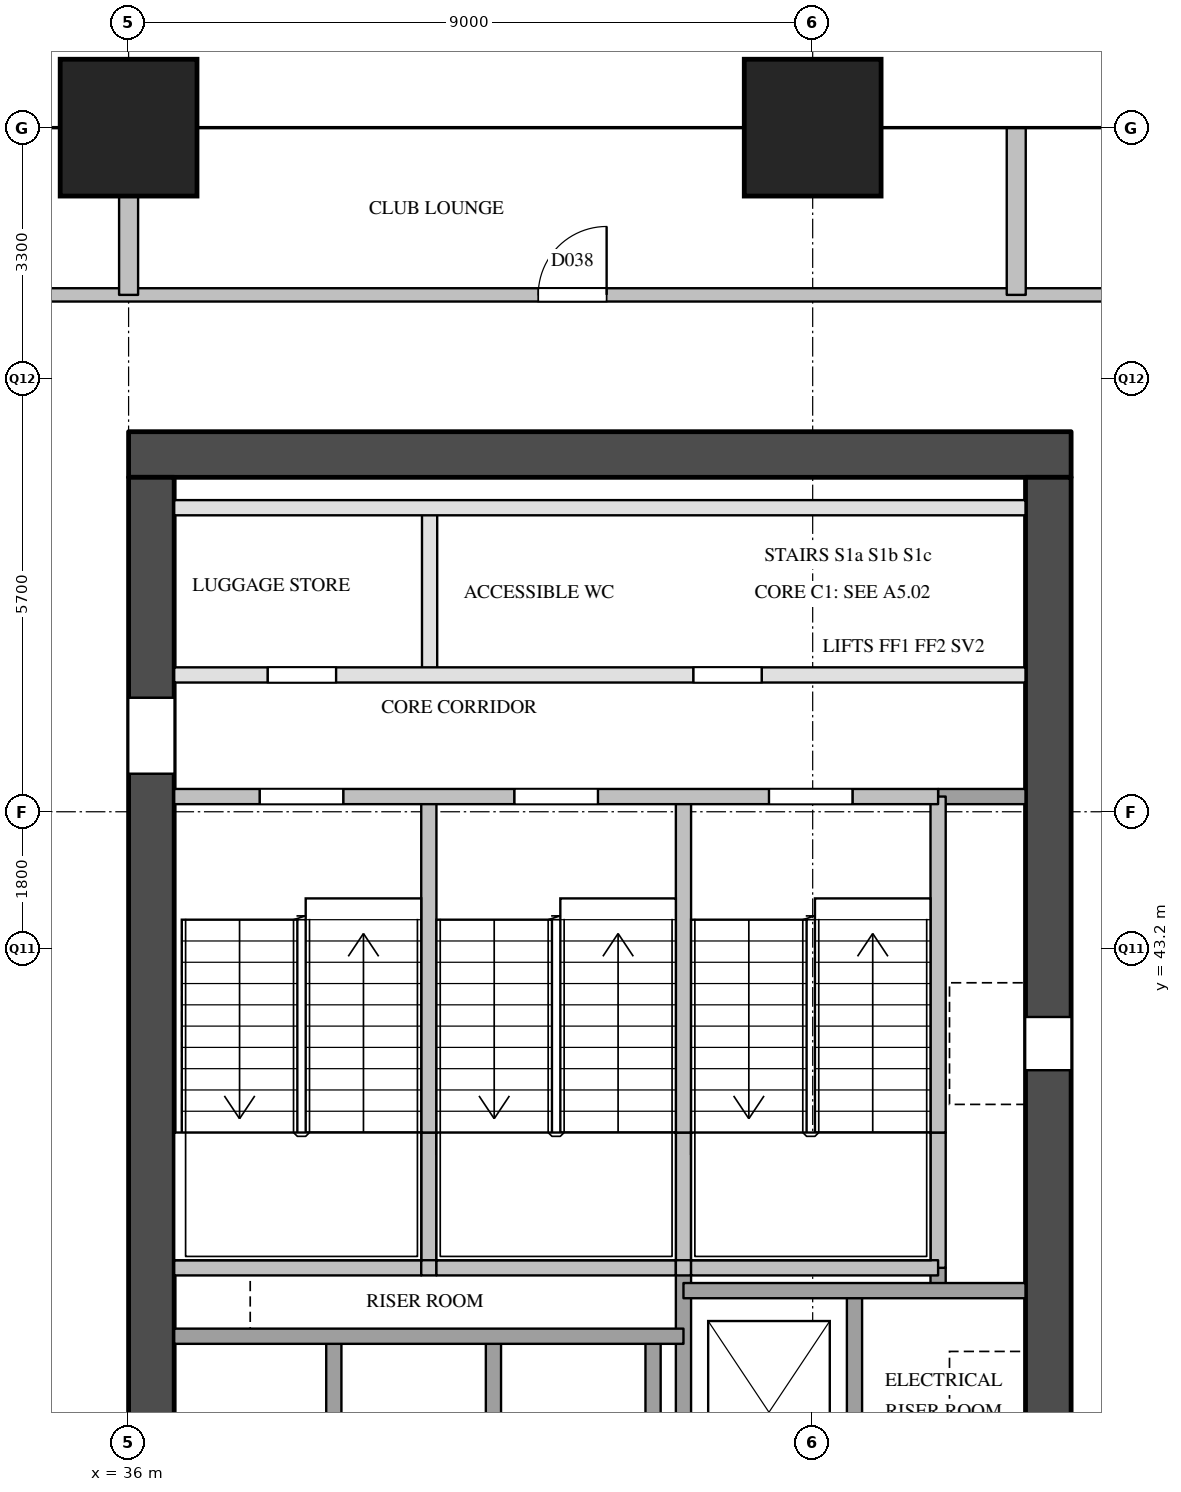
"""IFC4 building model, lengths in metres.
Left out: names, types, materials, properties, quantities, classifications, styles, units other than length and angle.
Written with IfcOpenShell. Run it as: python <this file> out.ifc"""

import sys

from ifc_helpers import new_model, si_unit, direction, frame, frame_2d, origin, origin_2d, place, context, subcontext, project, spatial, rectangle, extrude, element, fill, save


model = new_model("IFC4")
c1 = context("Model", 3, precision=1e-05, world=origin(), true_north=direction((0.0, 1.0)))
c2 = subcontext(c1, "Body", "Model", "MODEL_VIEW")
j1 = project(units=[si_unit("LENGTHUNIT", "METRE"), si_unit("PLANEANGLEUNIT", "RADIAN")], contexts=[c1])
p1 = place(None, origin())
s1 = spatial("IfcSite", under=j1, at=p1, CompositionType="ELEMENT")
p2 = place(p1, origin())
s2 = spatial("IfcBuilding", under=s1, at=p2, CompositionType="ELEMENT")
p3 = place(p2, frame((0.0, 0.0, 108.2)))
s3 = spatial("IfcBuildingStorey", under=s2, at=p3, CompositionType="ELEMENT", Elevation=108.2)
for number, where, z_axis, x_axis in (
    (1, (36.0, 54.0, 0.0), (0.0, 0.0, 1.0), (1.0, 0.0, 0.0)),
    (2, (45.0, 54.0, 0.0), (0.0, 0.0, 1.0), (1.0, 0.0, 0.0)),
):
    element("IfcColumn", number, at=place(p3, frame(where, z_axis=z_axis, x_axis=x_axis)), inside=s3, PredefinedType="COLUMN", context=c2, shape_type="SweptSolid", body=[
        extrude(rectangle(XDim=1.8, YDim=1.8, at=origin_2d()), origin(), (0.0, 0.0, 1.0), 3.8),
    ])
p4 = place(p3, frame((36.0, 49.7, 0.0), z_axis=(0.0, 0.0, 1.0), x_axis=(1.0, 0.0, 0.0)))
e3 = element("IfcWall", 3, at=p4, inside=s3, PredefinedType="SHEAR", context=c2, shape_type="SweptSolid", body=[
    extrude(rectangle(XDim=12.4, YDim=0.6, at=frame_2d((6.2, 0.0))), origin(), (0.0, 0.0, 1.0), 3.5),
])
p5 = place(p3, frame((36.3, 29.1, 0.0), z_axis=(0.0, 0.0, 1.0), x_axis=(0.0, 1.0, 0.0)))
e4 = element("IfcWall", 4, at=p5, inside=s3, PredefinedType="SHEAR", context=c2, shape_type="SweptSolid", body=[
    extrude(rectangle(XDim=20.3, YDim=0.6, at=frame_2d((10.15, 0.0))), origin(), (0.0, 0.0, 1.0), 3.5),
])
p6 = place(p5, frame((3.6, 0.0, 0.0)))
e5 = element("IfcOpeningElement", 5, at=p6, cuts=e4, PredefinedType="OPENING", context=c2, shape_type="SweptSolid", body=[
    extrude(rectangle(XDim=1.8, YDim=2.1, at=frame_2d((0.9, 1.05))), frame((0.0, 0.31, 0.0), z_axis=(0.0, -1.0, 0.0), x_axis=(1.0, 0.0, 0.0)), (0.0, 0.0, 1.0), 0.62),
])
p7 = place(p5, frame((16.4, 0.0, 0.0)))
e6 = element("IfcOpeningElement", 6, at=p7, cuts=e4, PredefinedType="OPENING", context=c2, shape_type="SweptSolid", body=[
    extrude(rectangle(XDim=1.0, YDim=2.1, at=frame_2d((0.5, 1.05))), frame((0.0, 0.31, 0.0), z_axis=(0.0, -1.0, 0.0), x_axis=(1.0, 0.0, 0.0)), (0.0, 0.0, 1.0), 0.62),
])
p8 = place(p3, frame((48.1, 29.1, 0.0), z_axis=(0.0, 0.0, 1.0), x_axis=(0.0, 1.0, 0.0)))
e7 = element("IfcWall", 7, at=p8, inside=s3, PredefinedType="SHEAR", context=c2, shape_type="SweptSolid", body=[
    extrude(rectangle(XDim=20.3, YDim=0.6, at=frame_2d((10.15, 0.0))), origin(), (0.0, 0.0, 1.0), 3.5),
])
p9 = place(p8, frame((12.5, 0.0, 0.0)))
e8 = element("IfcOpeningElement", 8, at=p9, cuts=e7, PredefinedType="OPENING", context=c2, shape_type="SweptSolid", body=[
    extrude(rectangle(XDim=0.7, YDim=2.1, at=frame_2d((0.35, 1.05))), frame((0.0, 0.31, 0.0), z_axis=(0.0, -1.0, 0.0), x_axis=(1.0, 0.0, 0.0)), (0.0, 0.0, 1.0), 0.62),
])
p10 = place(p8, frame((3.9, 0.0, 0.0)))
e9 = element("IfcOpeningElement", 9, at=p10, cuts=e7, PredefinedType="OPENING", context=c2, shape_type="SweptSolid", body=[
    extrude(rectangle(XDim=1.8, YDim=2.1, at=frame_2d((0.9, 1.05))), frame((0.0, 0.31, 0.0), z_axis=(0.0, -1.0, 0.0), x_axis=(1.0, 0.0, 0.0)), (0.0, 0.0, 1.0), 0.62),
])
p11 = place(p3, frame((38.7, 34.9, 0.0), z_axis=(0.0, 0.0, 1.0), x_axis=(0.0, 1.0, 0.0)))
e10 = element("IfcWall", 10, at=p11, inside=s3, PredefinedType="SOLIDWALL", context=c2, shape_type="SweptSolid", body=[
    extrude(rectangle(XDim=3.2, YDim=0.2, at=frame_2d((1.6, 0.0))), origin(), (0.0, 0.0, 1.0), 3.5),
])
p12 = place(p3, frame((39.95, 39.0, 0.0), z_axis=(0.0, 0.0, 1.0), x_axis=(0.0, 1.0, 0.0)))
e11 = element("IfcWall", 11, at=p12, inside=s3, PredefinedType="SOLIDWALL", context=c2, shape_type="SweptSolid", body=[
    extrude(rectangle(XDim=1.78, YDim=0.2, at=frame_2d((0.89, 0.0))), origin(), (0.0, 0.0, 1.0), 3.5),
])
p13 = place(p3, frame((39.95, 40.78, 0.0), z_axis=(0.0, 0.0, 1.0), x_axis=(0.0, 1.0, 0.0)))
e12 = element("IfcWall", 12, at=p13, inside=s3, PredefinedType="SOLIDWALL", context=c2, shape_type="SweptSolid", body=[
    extrude(rectangle(XDim=4.42, YDim=0.2, at=frame_2d((2.21, 0.0))), origin(), (0.0, 0.0, 1.0), 3.5),
])
p14 = place(p3, frame((39.96, 46.8, 0.0), z_axis=(0.0, 0.0, 1.0), x_axis=(0.0, 1.0, 0.0)))
e13 = element("IfcWall", 13, at=p14, inside=s3, PredefinedType="PARTITIONING", context=c2, shape_type="SweptSolid", body=[
    extrude(rectangle(XDim=2.2, YDim=0.2, at=frame_2d((1.1, 0.0))), origin(), (0.0, 0.0, 1.0), 3.5),
])
for number, where, z_axis, x_axis in (
    (14, (40.8, 34.9, 0.0), (0.0, 0.0, 1.0), (0.0, 1.0, 0.0)),
    (15, (42.9, 34.9, 0.0), (0.0, 0.0, 1.0), (0.0, 1.0, 0.0)),
):
    element("IfcWall", number, at=place(p3, frame(where, z_axis=z_axis, x_axis=x_axis)), inside=s3, PredefinedType="SOLIDWALL", context=c2, shape_type="SweptSolid", body=[
        extrude(rectangle(XDim=3.2, YDim=0.2, at=frame_2d((1.6, 0.0))), origin(), (0.0, 0.0, 1.0), 3.5),
    ])
p15 = place(p3, frame((43.3, 29.1, 0.0), z_axis=(0.0, 0.0, 1.0), x_axis=(0.0, 1.0, 0.0)))
e16 = element("IfcWall", 16, at=p15, inside=s3, PredefinedType="SOLIDWALL", context=c2, shape_type="SweptSolid", body=[
    extrude(rectangle(XDim=9.9, YDim=0.2, at=frame_2d((4.95, 0.0))), origin(), (0.0, 0.0, 1.0), 3.5),
])
p16 = place(p3, frame((43.3, 39.0, 0.0), z_axis=(0.0, 0.0, 1.0), x_axis=(0.0, 1.0, 0.0)))
e17 = element("IfcWall", 17, at=p16, inside=s3, PredefinedType="SOLIDWALL", context=c2, shape_type="SweptSolid", body=[
    extrude(rectangle(XDim=1.78, YDim=0.2, at=frame_2d((0.89, 0.0))), origin(), (0.0, 0.0, 1.0), 3.5),
])
p17 = place(p3, frame((43.3, 40.78, 0.0), z_axis=(0.0, 0.0, 1.0), x_axis=(0.0, 1.0, 0.0)))
e18 = element("IfcWall", 18, at=p17, inside=s3, PredefinedType="SOLIDWALL", context=c2, shape_type="SweptSolid", body=[
    extrude(rectangle(XDim=4.42, YDim=0.2, at=frame_2d((2.21, 0.0))), origin(), (0.0, 0.0, 1.0), 3.5),
])
p18 = place(p3, frame((45.55, 35.5, 0.0), z_axis=(0.0, 0.0, 1.0), x_axis=(0.0, 1.0, 0.0)))
e19 = element("IfcWall", 19, at=p18, inside=s3, PredefinedType="SOLIDWALL", context=c2, shape_type="SweptSolid", body=[
    extrude(rectangle(XDim=3.2, YDim=0.2, at=frame_2d((1.6, 0.0))), origin(), (0.0, 0.0, 1.0), 3.5),
])
p19 = place(p3, frame((46.65, 38.7, 0.0), z_axis=(0.0, 0.0, 1.0), x_axis=(0.0, 1.0, 0.0)))
e20 = element("IfcWall", 20, at=p19, inside=s3, PredefinedType="SOLIDWALL", context=c2, shape_type="SweptSolid", body=[
    extrude(rectangle(XDim=0.3, YDim=0.2, at=frame_2d((0.15, 0.0))), origin(), (0.0, 0.0, 1.0), 3.5),
])
p20 = place(p3, frame((46.65, 39.0, 0.0), z_axis=(0.0, 0.0, 1.0), x_axis=(0.0, 1.0, 0.0)))
e21 = element("IfcWall", 21, at=p20, inside=s3, PredefinedType="SOLIDWALL", context=c2, shape_type="SweptSolid", body=[
    extrude(rectangle(XDim=1.78, YDim=0.2, at=frame_2d((0.89, 0.0))), origin(), (0.0, 0.0, 1.0), 3.5),
])
p21 = place(p3, frame((46.65, 40.78, 0.0), z_axis=(0.0, 0.0, 1.0), x_axis=(0.0, 1.0, 0.0)))
e22 = element("IfcWall", 22, at=p21, inside=s3, PredefinedType="SOLIDWALL", context=c2, shape_type="SweptSolid", body=[
    extrude(rectangle(XDim=4.42, YDim=0.2, at=frame_2d((2.21, 0.0))), origin(), (0.0, 0.0, 1.0), 3.5),
])
p22 = place(p3, frame((36.6, 38.1, 0.0), z_axis=(0.0, 0.0, 1.0), x_axis=(1.0, 0.0, 0.0)))
e23 = element("IfcWall", 23, at=p22, inside=s3, PredefinedType="SOLIDWALL", context=c2, shape_type="SweptSolid", body=[
    extrude(rectangle(XDim=6.7, YDim=0.2, at=frame_2d((3.35, 0.0))), origin(), (0.0, 0.0, 1.0), 3.5),
])
p23 = place(p3, frame((43.3, 38.7, 0.0), z_axis=(0.0, 0.0, 1.0), x_axis=(1.0, 0.0, 0.0)))
e24 = element("IfcWall", 24, at=p23, inside=s3, PredefinedType="SOLIDWALL", context=c2, shape_type="SweptSolid", body=[
    extrude(rectangle(XDim=4.5, YDim=0.2, at=frame_2d((2.25, 0.0))), origin(), (0.0, 0.0, 1.0), 3.5),
])
p24 = place(p3, frame((36.6, 39.0, 0.0), z_axis=(0.0, 0.0, 1.0), x_axis=(1.0, 0.0, 0.0)))
e25 = element("IfcWall", 25, at=p24, inside=s3, PredefinedType="SOLIDWALL", context=c2, shape_type="SweptSolid", body=[
    extrude(rectangle(XDim=3.25, YDim=0.2, at=frame_2d((1.625, 0.0))), origin(), (0.0, 0.0, 1.0), 3.5),
])
p25 = place(p3, frame((39.85, 39.0, 0.0), z_axis=(0.0, 0.0, 1.0), x_axis=(1.0, 0.0, 0.0)))
e26 = element("IfcWall", 26, at=p25, inside=s3, PredefinedType="SOLIDWALL", context=c2, shape_type="SweptSolid", body=[
    extrude(rectangle(XDim=0.2, YDim=0.2, at=frame_2d((0.1, 0.0))), origin(), (0.0, 0.0, 1.0), 3.5),
])
p26 = place(p3, frame((40.05, 39.0, 0.0), z_axis=(0.0, 0.0, 1.0), x_axis=(1.0, 0.0, 0.0)))
e27 = element("IfcWall", 27, at=p26, inside=s3, PredefinedType="SOLIDWALL", context=c2, shape_type="SweptSolid", body=[
    extrude(rectangle(XDim=3.15, YDim=0.2, at=frame_2d((1.575, 0.0))), origin(), (0.0, 0.0, 1.0), 3.5),
])
p27 = place(p3, frame((43.2, 39.0, 0.0), z_axis=(0.0, 0.0, 1.0), x_axis=(1.0, 0.0, 0.0)))
e28 = element("IfcWall", 28, at=p27, inside=s3, PredefinedType="SOLIDWALL", context=c2, shape_type="SweptSolid", body=[
    extrude(rectangle(XDim=0.2, YDim=0.2, at=frame_2d((0.1, 0.0))), origin(), (0.0, 0.0, 1.0), 3.5),
])
p28 = place(p3, frame((43.4, 39.0, 0.0), z_axis=(0.0, 0.0, 1.0), x_axis=(1.0, 0.0, 0.0)))
e29 = element("IfcWall", 29, at=p28, inside=s3, PredefinedType="SOLIDWALL", context=c2, shape_type="SweptSolid", body=[
    extrude(rectangle(XDim=3.25, YDim=0.2, at=frame_2d((1.625, 0.0))), origin(), (0.0, 0.0, 1.0), 3.5),
])
p29 = place(p3, frame((46.65, 45.2, 0.0), z_axis=(0.0, 0.0, 1.0), x_axis=(1.0, 0.0, 0.0)))
e30 = element("IfcWall", 30, at=p29, inside=s3, PredefinedType="SOLIDWALL", context=c2, shape_type="SweptSolid", body=[
    extrude(rectangle(XDim=1.15, YDim=0.2, at=frame_2d((0.575, 0.0))), origin(), (0.0, 0.0, 1.0), 3.5),
])
p30 = place(p3, frame((36.6, 45.2, 0.0), z_axis=(0.0, 0.0, 1.0), x_axis=(1.0, 0.0, 0.0)))
e31 = element("IfcWall", 31, at=p30, inside=s3, PredefinedType="SOLIDWALL", context=c2, shape_type="SweptSolid", body=[
    extrude(rectangle(XDim=10.05, YDim=0.2, at=frame_2d((5.025, 0.0))), origin(), (0.0, 0.0, 1.0), 3.5),
])
p31 = place(p30, frame((1.125, 0.0, 0.0)))
e32 = element("IfcOpeningElement", 32, at=p31, cuts=e31, PredefinedType="OPENING", context=c2, shape_type="SweptSolid", body=[
    extrude(rectangle(XDim=1.1, YDim=2.1, at=frame_2d((0.55, 1.05))), frame((0.0, 0.11, 0.0), z_axis=(0.0, -1.0, 0.0), x_axis=(1.0, 0.0, 0.0)), (0.0, 0.0, 1.0), 0.22),
])
p32 = place(p30, frame((4.475, 0.0, 0.0)))
e33 = element("IfcOpeningElement", 33, at=p32, cuts=e31, PredefinedType="OPENING", context=c2, shape_type="SweptSolid", body=[
    extrude(rectangle(XDim=1.1, YDim=2.1, at=frame_2d((0.55, 1.05))), frame((0.0, 0.11, 0.0), z_axis=(0.0, -1.0, 0.0), x_axis=(1.0, 0.0, 0.0)), (0.0, 0.0, 1.0), 0.22),
])
p33 = place(p30, frame((7.825, 0.0, 0.0)))
e34 = element("IfcOpeningElement", 34, at=p33, cuts=e31, PredefinedType="OPENING", context=c2, shape_type="SweptSolid", body=[
    extrude(rectangle(XDim=1.1, YDim=2.1, at=frame_2d((0.55, 1.05))), frame((0.0, 0.11, 0.0), z_axis=(0.0, -1.0, 0.0), x_axis=(1.0, 0.0, 0.0)), (0.0, 0.0, 1.0), 0.22),
])
p34 = place(p3, frame((36.6, 46.8, 0.0), z_axis=(0.0, 0.0, 1.0), x_axis=(1.0, 0.0, 0.0)))
e35 = element("IfcWall", 35, at=p34, inside=s3, PredefinedType="PARTITIONING", context=c2, shape_type="SweptSolid", body=[
    extrude(rectangle(XDim=11.2, YDim=0.2, at=frame_2d((5.6, 0.0))), origin(), (0.0, 0.0, 1.0), 3.5),
])
p35 = place(p34, frame((1.23, 0.0, 0.0)))
e36 = element("IfcOpeningElement", 36, at=p35, cuts=e35, PredefinedType="OPENING", context=c2, shape_type="SweptSolid", body=[
    extrude(rectangle(XDim=0.9, YDim=2.1, at=frame_2d((0.45, 1.05))), frame((0.0, 0.11, 0.0), z_axis=(0.0, -1.0, 0.0), x_axis=(1.0, 0.0, 0.0)), (0.0, 0.0, 1.0), 0.22),
])
p36 = place(p34, frame((6.83, 0.0, 0.0)))
e37 = element("IfcOpeningElement", 37, at=p36, cuts=e35, PredefinedType="OPENING", context=c2, shape_type="SweptSolid", body=[
    extrude(rectangle(XDim=0.9, YDim=2.1, at=frame_2d((0.45, 1.05))), frame((0.0, 0.11, 0.0), z_axis=(0.0, -1.0, 0.0), x_axis=(1.0, 0.0, 0.0)), (0.0, 0.0, 1.0), 0.22),
])
p37 = place(p3, frame((36.6, 49.0, 0.0), z_axis=(0.0, 0.0, 1.0), x_axis=(1.0, 0.0, 0.0)))
e38 = element("IfcWall", 38, at=p37, inside=s3, PredefinedType="PARTITIONING", context=c2, shape_type="SweptSolid", body=[
    extrude(rectangle(XDim=11.2, YDim=0.2, at=frame_2d((5.6, 0.0))), origin(), (0.0, 0.0, 1.0), 3.5),
])
p38 = place(p3, frame((34.2, 51.8, 0.0), z_axis=(0.0, 0.0, 1.0), x_axis=(1.0, 0.0, 0.0)))
e39 = element("IfcWall", 39, at=p38, inside=s3, PredefinedType="PARTITIONING", context=c2, shape_type="SweptSolid", body=[
    extrude(rectangle(XDim=16.0, YDim=0.175, at=frame_2d((8.0, 0.0))), origin(), (0.0, 0.0, 1.0), 3.5),
])
p39 = place(p38, frame((7.189, 0.0, 0.0)))
e40 = element("IfcOpeningElement", 40, at=p39, cuts=e39, PredefinedType="OPENING", context=c2, shape_type="SweptSolid", body=[
    extrude(rectangle(XDim=0.9, YDim=2.1, at=frame_2d((0.45, 1.05))), frame((0.0, 0.097, 0.0), z_axis=(0.0, -1.0, 0.0), x_axis=(1.0, 0.0, 0.0)), (0.0, 0.0, 1.0), 0.195),
])
p40 = place(p3, frame((36.0, 51.8, 0.0), z_axis=(0.0, 0.0, 1.0), x_axis=(0.0, 1.0, 0.0)))
e41 = element("IfcWall", 41, at=p40, inside=s3, PredefinedType="PARTITIONING", context=c2, shape_type="SweptSolid", body=[
    extrude(rectangle(XDim=2.2, YDim=0.25, at=frame_2d((1.1, 0.0))), origin(), (0.0, 0.0, 1.0), 3.5),
])
p41 = place(p3, frame((47.678, 51.8, 0.0), z_axis=(0.0, 0.0, 1.0), x_axis=(0.0, 1.0, 0.0)))
e42 = element("IfcWall", 42, at=p41, inside=s3, PredefinedType="PARTITIONING", context=c2, shape_type="SweptSolid", body=[
    extrude(rectangle(XDim=2.2, YDim=0.25, at=frame_2d((1.1, 0.0))), origin(), (0.0, 0.0, 1.0), 2.5),
])
p42 = place(p31, origin())
e43 = element("IfcDoor", 43, at=p42, inside=s3, OperationType="SINGLE_SWING_LEFT", PredefinedType="DOOR", context=c2, shape_type="SweptSolid", body=[
    extrude(rectangle(XDim=1.1, YDim=2.1, at=frame_2d((0.55, 1.05))), frame((0.0, 0.025, 0.0), z_axis=(0.0, -1.0, 0.0), x_axis=(1.0, 0.0, 0.0)), (0.0, 0.0, 1.0), 0.05),
])
fill(e32, e43)
p43 = place(p32, origin())
e44 = element("IfcDoor", 44, at=p43, inside=s3, OperationType="SINGLE_SWING_RIGHT", PredefinedType="DOOR", context=c2, shape_type="SweptSolid", body=[
    extrude(rectangle(XDim=1.1, YDim=2.1, at=frame_2d((0.55, 1.05))), frame((0.0, 0.025, 0.0), z_axis=(0.0, -1.0, 0.0), x_axis=(1.0, 0.0, 0.0)), (0.0, 0.0, 1.0), 0.05),
])
fill(e33, e44)
p44 = place(p33, origin())
e45 = element("IfcDoor", 45, at=p44, inside=s3, OperationType="SINGLE_SWING_RIGHT", PredefinedType="DOOR", context=c2, shape_type="SweptSolid", body=[
    extrude(rectangle(XDim=1.1, YDim=2.1, at=frame_2d((0.55, 1.05))), frame((0.0, 0.025, 0.0), z_axis=(0.0, -1.0, 0.0), x_axis=(1.0, 0.0, 0.0)), (0.0, 0.0, 1.0), 0.05),
])
fill(e34, e45)
p45 = place(p9, origin())
e46 = element("IfcDoor", 46, at=p45, inside=s3, OperationType="SINGLE_SWING_RIGHT", PredefinedType="DOOR", context=c2, shape_type="SweptSolid", body=[
    extrude(rectangle(XDim=0.7, YDim=2.1, at=frame_2d((0.35, 1.05))), frame((0.0, 0.025, 0.0), z_axis=(0.0, -1.0, 0.0), x_axis=(1.0, 0.0, 0.0)), (0.0, 0.0, 1.0), 0.05),
])
fill(e8, e46)
p46 = place(p7, origin())
e47 = element("IfcDoor", 47, at=p46, inside=s3, OperationType="SINGLE_SWING_RIGHT", PredefinedType="DOOR", context=c2, shape_type="SweptSolid", body=[
    extrude(rectangle(XDim=1.0, YDim=2.1, at=frame_2d((0.5, 1.05))), frame((0.0, 0.025, 0.0), z_axis=(0.0, -1.0, 0.0), x_axis=(1.0, 0.0, 0.0)), (0.0, 0.0, 1.0), 0.05),
])
fill(e6, e47)
p47 = place(p35, origin())
e48 = element("IfcDoor", 48, at=p47, inside=s3, OperationType="SINGLE_SWING_LEFT", PredefinedType="DOOR", context=c2, shape_type="SweptSolid", body=[
    extrude(rectangle(XDim=0.9, YDim=2.1, at=frame_2d((0.45, 1.05))), frame((0.0, 0.025, 0.0), z_axis=(0.0, -1.0, 0.0), x_axis=(1.0, 0.0, 0.0)), (0.0, 0.0, 1.0), 0.05),
])
fill(e36, e48)
p48 = place(p36, origin())
e49 = element("IfcDoor", 49, at=p48, inside=s3, OperationType="SINGLE_SWING_RIGHT", PredefinedType="DOOR", context=c2, shape_type="SweptSolid", body=[
    extrude(rectangle(XDim=0.9, YDim=2.1, at=frame_2d((0.45, 1.05))), frame((0.0, 0.025, 0.0), z_axis=(0.0, -1.0, 0.0), x_axis=(1.0, 0.0, 0.0)), (0.0, 0.0, 1.0), 0.05),
])
fill(e37, e49)
p49 = place(p39, origin())
e50 = element("IfcDoor", 50, at=p49, inside=s3, OperationType="SINGLE_SWING_RIGHT", PredefinedType="DOOR", context=c2, shape_type="SweptSolid", body=[
    extrude(rectangle(XDim=0.9, YDim=2.1, at=frame_2d((0.45, 1.05))), frame((0.0, 0.025, 0.0), z_axis=(0.0, -1.0, 0.0), x_axis=(1.0, 0.0, 0.0)), (0.0, 0.0, 1.0), 0.05),
])
fill(e40, e50)
save(model, sys.argv[1])
